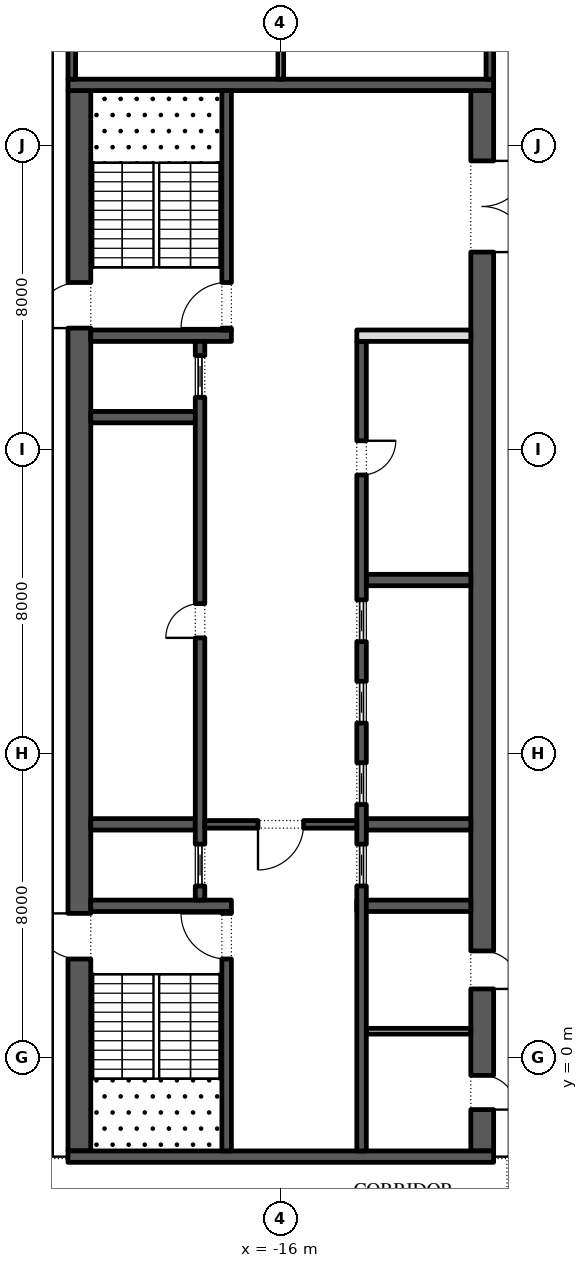
"""IFC4 building model, lengths in metres.
Left out: names, types, materials, properties, quantities, classifications, styles, units other than length and angle.
Written with IfcOpenShell. Run it as: python <this file> out.ifc"""

import sys

from ifc_helpers import new_model, si_unit, direction, frame, frame_2d, origin, place, context, subcontext, project, spatial, rectangle, extrude, element, fill, save


model = new_model("IFC4")
c1 = context("Model", 3, precision=1e-05, world=origin(), true_north=direction((0.0, 1.0)))
c2 = subcontext(c1, "Body", "Model", "MODEL_VIEW")
j1 = project(units=[si_unit("LENGTHUNIT", "METRE"), si_unit("PLANEANGLEUNIT", "RADIAN")], contexts=[c1])
p1 = place(None, origin())
s1 = spatial("IfcSite", under=j1, at=p1, CompositionType="ELEMENT")
p2 = place(p1, origin())
s2 = spatial("IfcBuilding", under=s1, at=p2, CompositionType="ELEMENT")
p3 = place(p2, frame((0.0, 0.0, 280.8)))
s3 = spatial("IfcBuildingStorey", under=s2, at=p3, CompositionType="ELEMENT", Elevation=280.8)
p4 = place(p3, frame((-21.359, 48.678, 0.0), z_axis=(0.0, 0.0, 1.0), x_axis=(-0.224949198343, -0.974370493275, 0.0)))
e1 = element("IfcWall", 1, at=p4, inside=s3, PredefinedType="STANDARD", context=c2, shape_type="SweptSolid", body=[
    extrude(rectangle(XDim=49.5, YDim=0.3, at=frame_2d((24.75, 0.0))), origin(), (0.0, 0.0, 1.0), 4.0),
])
p5 = place(p4, frame((1.157, 0.0, 0.45)))
e2 = element("IfcOpeningElement", 2, at=p5, cuts=e1, PredefinedType="OPENING", context=c2, shape_type="SweptSolid", body=[
    extrude(rectangle(XDim=4.5, YDim=3.05, at=frame_2d((2.25, 1.525))), frame((0.0, 0.16, 0.0), z_axis=(0.0, -1.0, 0.0), x_axis=(1.0, 0.0, 0.0)), (0.0, 0.0, 1.0), 0.32),
])
p6 = place(p4, frame((9.171, 0.0, 0.0)))
e3 = element("IfcOpeningElement", 3, at=p6, cuts=e1, PredefinedType="OPENING", context=c2, shape_type="SweptSolid", body=[
    extrude(rectangle(XDim=2.4, YDim=3.5, at=frame_2d((1.2, 1.75))), frame((0.0, 0.16, 0.0), z_axis=(0.0, -1.0, 0.0), x_axis=(1.0, 0.0, 0.0)), (0.0, 0.0, 1.0), 0.32),
])
p7 = place(p4, frame((15.236, 0.0, 0.45)))
e4 = element("IfcOpeningElement", 4, at=p7, cuts=e1, PredefinedType="OPENING", context=c2, shape_type="SweptSolid", body=[
    extrude(rectangle(XDim=4.5, YDim=3.05, at=frame_2d((2.25, 1.525))), frame((0.0, 0.16, 0.0), z_axis=(0.0, -1.0, 0.0), x_axis=(1.0, 0.0, 0.0)), (0.0, 0.0, 1.0), 0.32),
])
p8 = place(p4, frame((22.35, 0.0, 0.45)))
e5 = element("IfcOpeningElement", 5, at=p8, cuts=e1, PredefinedType="OPENING", context=c2, shape_type="SweptSolid", body=[
    extrude(rectangle(XDim=4.5, YDim=3.05, at=frame_2d((2.25, 1.525))), frame((0.0, 0.16, 0.0), z_axis=(0.0, -1.0, 0.0), x_axis=(1.0, 0.0, 0.0)), (0.0, 0.0, 1.0), 0.32),
])
p9 = place(p4, frame((29.464, 0.0, 0.45)))
e6 = element("IfcOpeningElement", 6, at=p9, cuts=e1, PredefinedType="OPENING", context=c2, shape_type="SweptSolid", body=[
    extrude(rectangle(XDim=4.5, YDim=3.05, at=frame_2d((2.25, 1.525))), frame((0.0, 0.16, 0.0), z_axis=(0.0, -1.0, 0.0), x_axis=(1.0, 0.0, 0.0)), (0.0, 0.0, 1.0), 0.32),
])
p10 = place(p4, frame((37.628, 0.0, 0.0)))
e7 = element("IfcOpeningElement", 7, at=p10, cuts=e1, PredefinedType="OPENING", context=c2, shape_type="SweptSolid", body=[
    extrude(rectangle(XDim=2.4, YDim=3.325, at=frame_2d((1.2, 1.663))), frame((0.0, 0.16, 0.0), z_axis=(0.0, -1.0, 0.0), x_axis=(1.0, 0.0, 0.0)), (0.0, 0.0, 1.0), 0.32),
])
p11 = place(p4, frame((43.693, 0.0, 0.45)))
e8 = element("IfcOpeningElement", 8, at=p11, cuts=e1, PredefinedType="OPENING", context=c2, shape_type="SweptSolid", body=[
    extrude(rectangle(XDim=4.5, YDim=2.825, at=frame_2d((2.25, 1.413))), frame((0.0, 0.16, 0.0), z_axis=(0.0, -1.0, 0.0), x_axis=(1.0, 0.0, 0.0)), (0.0, 0.0, 1.0), 0.32),
])
p12 = place(p3, frame((-21.3, -2.45, 0.0), z_axis=(0.0, 0.0, 1.0), x_axis=(0.0, 1.0, 0.0)))
e9 = element("IfcWall", 9, at=p12, inside=s3, PredefinedType="SHEAR", context=c2, shape_type="SweptSolid", body=[
    extrude(rectangle(XDim=27.9, YDim=0.6, at=frame_2d((13.95, 0.0))), origin(), (0.0, 0.0, 1.0), 4.0),
])
p13 = place(p12, frame((5.05, 0.0, 0.0)))
e10 = element("IfcOpeningElement", 10, at=p13, cuts=e9, PredefinedType="OPENING", context=c2, shape_type="SweptSolid", body=[
    extrude(rectangle(XDim=1.2, YDim=2.1, at=frame_2d((0.6, 1.05))), frame((0.0, 0.31, 0.0), z_axis=(0.0, -1.0, 0.0), x_axis=(1.0, 0.0, 0.0)), (0.0, 0.0, 1.0), 0.62),
])
p14 = place(p12, frame((21.65, 0.0, 0.0)))
e11 = element("IfcOpeningElement", 11, at=p14, cuts=e9, PredefinedType="OPENING", context=c2, shape_type="SweptSolid", body=[
    extrude(rectangle(XDim=1.2, YDim=2.1, at=frame_2d((0.6, 1.05))), frame((0.0, 0.31, 0.0), z_axis=(0.0, -1.0, 0.0), x_axis=(1.0, 0.0, 0.0)), (0.0, 0.0, 1.0), 0.62),
])
p15 = place(p3, frame((-10.7, -2.45, 0.0), z_axis=(0.0, 0.0, 1.0), x_axis=(0.0, 1.0, 0.0)))
e12 = element("IfcWall", 12, at=p15, inside=s3, PredefinedType="SHEAR", context=c2, shape_type="SweptSolid", body=[
    extrude(rectangle(XDim=27.9, YDim=0.6, at=frame_2d((13.95, 0.0))), origin(), (0.0, 0.0, 1.0), 4.0),
])
p16 = place(p15, frame((23.65, 0.0, 0.0)))
e13 = element("IfcOpeningElement", 13, at=p16, cuts=e12, PredefinedType="OPENING", context=c2, shape_type="SweptSolid", body=[
    extrude(rectangle(XDim=2.4, YDim=2.1, at=frame_2d((1.2, 1.05))), frame((0.0, 0.31, 0.0), z_axis=(0.0, -1.0, 0.0), x_axis=(1.0, 0.0, 0.0)), (0.0, 0.0, 1.0), 0.62),
])
p17 = place(p15, frame((1.087, 0.0, 0.0)))
e14 = element("IfcOpeningElement", 14, at=p17, cuts=e12, PredefinedType="OPENING", context=c2, shape_type="SweptSolid", body=[
    extrude(rectangle(XDim=0.9, YDim=2.1, at=frame_2d((0.45, 1.05))), frame((0.0, 0.31, 0.0), z_axis=(0.0, -1.0, 0.0), x_axis=(1.0, 0.0, 0.0)), (0.0, 0.0, 1.0), 0.62),
])
p18 = place(p15, frame((4.262, 0.0, 0.0)))
e15 = element("IfcOpeningElement", 15, at=p18, cuts=e12, PredefinedType="OPENING", context=c2, shape_type="SweptSolid", body=[
    extrude(rectangle(XDim=1.0, YDim=2.1, at=frame_2d((0.5, 1.05))), frame((0.0, 0.31, 0.0), z_axis=(0.0, -1.0, 0.0), x_axis=(1.0, 0.0, 0.0)), (0.0, 0.0, 1.0), 0.62),
])
for number, where, z_axis, x_axis in (
    (16, (-21.6, -2.6, 0.0), (0.0, 0.0, 1.0), (1.0, 0.0, 0.0)),
    (17, (-21.6, 25.6, 0.0), (0.0, 0.0, 1.0), (1.0, 0.0, 0.0)),
):
    element("IfcWall", number, at=place(p3, frame(where, z_axis=z_axis, x_axis=x_axis)), inside=s3, PredefinedType="SHEAR", context=c2, shape_type="SweptSolid", body=[
        extrude(rectangle(XDim=11.2, YDim=0.3, at=frame_2d((5.6, 0.0))), origin(), (0.0, 0.0, 1.0), 4.0),
    ])
p19 = place(p3, frame((-21.0, 4.0, 0.0), z_axis=(0.0, 0.0, 1.0), x_axis=(1.0, 0.0, 0.0)))
e18 = element("IfcWall", 18, at=p19, inside=s3, PredefinedType="SHEAR", context=c2, shape_type="SweptSolid", body=[
    extrude(rectangle(XDim=3.7, YDim=0.3, at=frame_2d((1.85, 0.0))), origin(), (0.0, 0.0, 1.0), 4.0),
])
p20 = place(p3, frame((-17.425, -2.45, 0.0), z_axis=(0.0, 0.0, 1.0), x_axis=(0.0, 1.0, 0.0)))
e19 = element("IfcWall", 19, at=p20, inside=s3, PredefinedType="SHEAR", context=c2, shape_type="SweptSolid", body=[
    extrude(rectangle(XDim=6.3, YDim=0.25, at=frame_2d((3.15, 0.0))), origin(), (0.0, 0.0, 1.0), 4.0),
])
p21 = place(p20, frame((5.05, 0.0, 0.0)))
e20 = element("IfcOpeningElement", 20, at=p21, cuts=e19, PredefinedType="OPENING", context=c2, shape_type="SweptSolid", body=[
    extrude(rectangle(XDim=1.2, YDim=2.1, at=frame_2d((0.6, 1.05))), frame((0.0, 0.135, 0.0), z_axis=(0.0, -1.0, 0.0), x_axis=(1.0, 0.0, 0.0)), (0.0, 0.0, 1.0), 0.27),
])
p22 = place(p3, frame((-21.0, 19.0, 0.0), z_axis=(0.0, 0.0, 1.0), x_axis=(1.0, 0.0, 0.0)))
e21 = element("IfcWall", 21, at=p22, inside=s3, PredefinedType="SHEAR", context=c2, shape_type="SweptSolid", body=[
    extrude(rectangle(XDim=3.7, YDim=0.3, at=frame_2d((1.85, 0.0))), origin(), (0.0, 0.0, 1.0), 4.0),
])
p23 = place(p3, frame((-17.425, 19.15, 0.0), z_axis=(0.0, 0.0, 1.0), x_axis=(0.0, 1.0, 0.0)))
e22 = element("IfcWall", 22, at=p23, inside=s3, PredefinedType="SHEAR", context=c2, shape_type="SweptSolid", body=[
    extrude(rectangle(XDim=6.3, YDim=0.25, at=frame_2d((3.15, 0.0))), origin(), (0.0, 0.0, 1.0), 4.0),
])
p24 = place(p23, frame((0.05, 0.0, 0.0)))
e23 = element("IfcOpeningElement", 23, at=p24, cuts=e22, PredefinedType="OPENING", context=c2, shape_type="SweptSolid", body=[
    extrude(rectangle(XDim=1.2, YDim=2.1, at=frame_2d((0.6, 1.05))), frame((0.0, 0.135, 0.0), z_axis=(0.0, -1.0, 0.0), x_axis=(1.0, 0.0, 0.0)), (0.0, 0.0, 1.0), 0.27),
])
for number, where, z_axis, x_axis in (
    (24, (-21.0, 6.143, 0.0), (0.0, 0.0, 1.0), (1.0, 0.0, 0.0)),
    (25, (-21.0, 16.857, 0.0), (0.0, 0.0, 1.0), (1.0, 0.0, 0.0)),
):
    element("IfcWall", number, at=place(p3, frame(where, z_axis=z_axis, x_axis=x_axis)), inside=s3, PredefinedType="SHEAR", context=c2, shape_type="SweptSolid", body=[
        extrude(rectangle(XDim=2.75, YDim=0.3, at=frame_2d((1.375, 0.0))), origin(), (0.0, 0.0, 1.0), 4.0),
    ])
p25 = place(p3, frame((-18.125, 4.15, 0.0), z_axis=(0.0, 0.0, 1.0), x_axis=(0.0, 1.0, 0.0)))
e26 = element("IfcWall", 26, at=p25, inside=s3, PredefinedType="SHEAR", context=c2, shape_type="SweptSolid", body=[
    extrude(rectangle(XDim=14.7, YDim=0.25, at=frame_2d((7.35, 0.0))), origin(), (0.0, 0.0, 1.0), 4.0),
])
p26 = place(p25, frame((6.9, 0.0, 0.0)))
e27 = element("IfcOpeningElement", 27, at=p26, cuts=e26, PredefinedType="OPENING", context=c2, shape_type="SweptSolid", body=[
    extrude(rectangle(XDim=0.9, YDim=2.1, at=frame_2d((0.45, 1.05))), frame((0.0, 0.135, 0.0), z_axis=(0.0, -1.0, 0.0), x_axis=(1.0, 0.0, 0.0)), (0.0, 0.0, 1.0), 0.27),
])
p27 = place(p25, frame((0.371, 0.0, 0.0)))
e28 = element("IfcOpeningElement", 28, at=p27, cuts=e26, PredefinedType="OPENING", context=c2, shape_type="SweptSolid", body=[
    extrude(rectangle(XDim=1.1, YDim=2.1, at=frame_2d((0.55, 1.05))), frame((0.0, 0.135, 0.0), z_axis=(0.0, -1.0, 0.0), x_axis=(1.0, 0.0, 0.0)), (0.0, 0.0, 1.0), 0.27),
])
p28 = place(p25, frame((13.229, 0.0, 0.0)))
e29 = element("IfcOpeningElement", 29, at=p28, cuts=e26, PredefinedType="OPENING", context=c2, shape_type="SweptSolid", body=[
    extrude(rectangle(XDim=1.1, YDim=2.1, at=frame_2d((0.55, 1.05))), frame((0.0, 0.135, 0.0), z_axis=(0.0, -1.0, 0.0), x_axis=(1.0, 0.0, 0.0)), (0.0, 0.0, 1.0), 0.27),
])
p29 = place(p3, frame((-14.0, 4.0, 0.0), z_axis=(0.0, 0.0, 1.0), x_axis=(1.0, 0.0, 0.0)))
e30 = element("IfcWall", 30, at=p29, inside=s3, PredefinedType="SHEAR", context=c2, shape_type="SweptSolid", body=[
    extrude(rectangle(XDim=3.0, YDim=0.3, at=frame_2d((1.5, 0.0))), origin(), (0.0, 0.0, 1.0), 4.0),
])
for number, where, z_axis, x_axis in (
    (31, (-13.75, 6.143, 0.0), (0.0, 0.0, 1.0), (1.0, 0.0, 0.0)),
    (32, (-13.75, 12.571, 0.0), (0.0, 0.0, 1.0), (1.0, 0.0, 0.0)),
):
    element("IfcWall", number, at=place(p3, frame(where, z_axis=z_axis, x_axis=x_axis)), inside=s3, PredefinedType="SHEAR", context=c2, shape_type="SweptSolid", body=[
        extrude(rectangle(XDim=2.75, YDim=0.3, at=frame_2d((1.375, 0.0))), origin(), (0.0, 0.0, 1.0), 4.0),
    ])
p30 = place(p3, frame((-13.875, -2.45, 0.0), z_axis=(0.0, 0.0, 1.0), x_axis=(0.0, 1.0, 0.0)))
e33 = element("IfcWall", 33, at=p30, inside=s3, PredefinedType="SHEAR", context=c2, shape_type="SweptSolid", body=[
    extrude(rectangle(XDim=21.3, YDim=0.25, at=frame_2d((10.65, 0.0))), origin(), (0.0, 0.0, 1.0), 4.0),
])
p31 = place(p30, frame((17.786, 0.0, 0.0)))
e34 = element("IfcOpeningElement", 34, at=p31, cuts=e33, PredefinedType="OPENING", context=c2, shape_type="SweptSolid", body=[
    extrude(rectangle(XDim=0.9, YDim=2.1, at=frame_2d((0.45, 1.05))), frame((0.0, 0.135, 0.0), z_axis=(0.0, -1.0, 0.0), x_axis=(1.0, 0.0, 0.0)), (0.0, 0.0, 1.0), 0.27),
])
p32 = place(p30, frame((6.971, 0.0, 0.0)))
e35 = element("IfcOpeningElement", 35, at=p32, cuts=e33, PredefinedType="OPENING", context=c2, shape_type="SweptSolid", body=[
    extrude(rectangle(XDim=1.1, YDim=2.1, at=frame_2d((0.55, 1.05))), frame((0.0, 0.135, 0.0), z_axis=(0.0, -1.0, 0.0), x_axis=(1.0, 0.0, 0.0)), (0.0, 0.0, 1.0), 0.27),
])
p33 = place(p30, frame((9.114, 0.0, 0.0)))
e36 = element("IfcOpeningElement", 36, at=p33, cuts=e33, PredefinedType="OPENING", context=c2, shape_type="SweptSolid", body=[
    extrude(rectangle(XDim=1.1, YDim=2.1, at=frame_2d((0.55, 1.05))), frame((0.0, 0.135, 0.0), z_axis=(0.0, -1.0, 0.0), x_axis=(1.0, 0.0, 0.0)), (0.0, 0.0, 1.0), 0.27),
])
p34 = place(p30, frame((11.257, 0.0, 0.0)))
e37 = element("IfcOpeningElement", 37, at=p34, cuts=e33, PredefinedType="OPENING", context=c2, shape_type="SweptSolid", body=[
    extrude(rectangle(XDim=1.1, YDim=2.1, at=frame_2d((0.55, 1.05))), frame((0.0, 0.135, 0.0), z_axis=(0.0, -1.0, 0.0), x_axis=(1.0, 0.0, 0.0)), (0.0, 0.0, 1.0), 0.27),
])
p35 = place(p30, frame((13.4, 0.0, 0.0)))
e38 = element("IfcOpeningElement", 38, at=p35, cuts=e33, PredefinedType="OPENING", context=c2, shape_type="SweptSolid", body=[
    extrude(rectangle(XDim=1.1, YDim=2.1, at=frame_2d((0.55, 1.05))), frame((0.0, 0.135, 0.0), z_axis=(0.0, -1.0, 0.0), x_axis=(1.0, 0.0, 0.0)), (0.0, 0.0, 1.0), 0.27),
])
p36 = place(p3, frame((-14.0, 19.0, 0.0), z_axis=(0.0, 0.0, 1.0), x_axis=(1.0, 0.0, 0.0)))
e39 = element("IfcWall", 39, at=p36, inside=s3, PredefinedType="PARTITIONING", context=c2, shape_type="SweptSolid", body=[
    extrude(rectangle(XDim=3.0, YDim=0.3, at=frame_2d((1.5, 0.0))), origin(), (0.0, 0.0, 1.0), 4.0),
])
p37 = place(p3, frame((-18.0, 6.143, 0.0), z_axis=(0.0, 0.0, 1.0), x_axis=(1.0, 0.0, 0.0)))
e40 = element("IfcWall", 40, at=p37, inside=s3, PredefinedType="SHEAR", context=c2, shape_type="SweptSolid", body=[
    extrude(rectangle(XDim=4.0, YDim=0.2, at=frame_2d((2.0, 0.0))), origin(), (0.0, 0.0, 1.0), 4.0),
])
p38 = place(p37, frame((1.4, 0.0, 0.0)))
e41 = element("IfcOpeningElement", 41, at=p38, cuts=e40, PredefinedType="OPENING", context=c2, shape_type="SweptSolid", body=[
    extrude(rectangle(XDim=1.2, YDim=2.1, at=frame_2d((0.6, 1.05))), frame((0.0, 0.11, 0.0), z_axis=(0.0, -1.0, 0.0), x_axis=(1.0, 0.0, 0.0)), (0.0, 0.0, 1.0), 0.22),
])
p39 = place(p3, frame((-13.75, 0.7, 0.0), z_axis=(0.0, 0.0, 1.0), x_axis=(1.0, 0.0, 0.0)))
e42 = element("IfcWall", 42, at=p39, inside=s3, PredefinedType="PARTITIONING", context=c2, shape_type="SweptSolid", body=[
    extrude(rectangle(XDim=2.75, YDim=0.15, at=frame_2d((1.375, 0.0))), origin(), (0.0, 0.0, 1.0), 4.0),
])
p40 = place(p3, frame((-21.5, 25.75, 0.0), z_axis=(0.0, 0.0, 1.0), x_axis=(0.0, 1.0, 0.0)))
e43 = element("IfcWall", 43, at=p40, inside=s3, PredefinedType="SHEAR", context=c2, shape_type="SweptSolid", body=[
    extrude(rectangle(XDim=4.75, YDim=0.2, at=frame_2d((2.375, 0.0))), origin(), (0.0, 0.0, 1.0), 4.0),
])
p41 = place(p40, frame((1.925, 0.0, 0.0)))
e44 = element("IfcOpeningElement", 44, at=p41, cuts=e43, PredefinedType="OPENING", context=c2, shape_type="SweptSolid", body=[
    extrude(rectangle(XDim=0.9, YDim=2.1, at=frame_2d((0.45, 1.05))), frame((0.0, 0.11, 0.0), z_axis=(0.0, -1.0, 0.0), x_axis=(1.0, 0.0, 0.0)), (0.0, 0.0, 1.0), 0.22),
])
p42 = place(p3, frame((-10.5, 25.75, 0.0), z_axis=(0.0, 0.0, 1.0), x_axis=(0.0, 1.0, 0.0)))
e45 = element("IfcWall", 45, at=p42, inside=s3, PredefinedType="SHEAR", context=c2, shape_type="SweptSolid", body=[
    extrude(rectangle(XDim=4.75, YDim=0.2, at=frame_2d((2.375, 0.0))), origin(), (0.0, 0.0, 1.0), 4.0),
])
p43 = place(p42, frame((1.925, 0.0, 0.0)))
e46 = element("IfcOpeningElement", 46, at=p43, cuts=e45, PredefinedType="OPENING", context=c2, shape_type="SweptSolid", body=[
    extrude(rectangle(XDim=0.9, YDim=2.1, at=frame_2d((0.45, 1.05))), frame((0.0, 0.11, 0.0), z_axis=(0.0, -1.0, 0.0), x_axis=(1.0, 0.0, 0.0)), (0.0, 0.0, 1.0), 0.22),
])
p44 = place(p3, frame((-16.0, 25.75, 0.0), z_axis=(0.0, 0.0, 1.0), x_axis=(0.0, 1.0, 0.0)))
e47 = element("IfcWall", 47, at=p44, inside=s3, PredefinedType="PARTITIONING", context=c2, shape_type="SweptSolid", body=[
    extrude(rectangle(XDim=4.75, YDim=0.15, at=frame_2d((2.375, 0.0))), origin(), (0.0, 0.0, 1.0), 4.0),
])
p45 = place(p26, origin())
e48 = element("IfcDoor", 48, at=p45, inside=s3, OperationType="SINGLE_SWING_RIGHT", PredefinedType="DOOR", context=c2, shape_type="SweptSolid", body=[
    extrude(rectangle(XDim=0.9, YDim=2.1, at=frame_2d((0.45, 1.05))), frame((0.0, 0.125, 0.0), z_axis=(0.0, -1.0, 0.0), x_axis=(1.0, 0.0, 0.0)), (0.0, 0.0, 1.0), 0.05),
])
fill(e27, e48)
p46 = place(p27, origin())
e49 = element("IfcDoor", 49, at=p46, inside=s3, OperationType="SLIDING_TO_LEFT", PredefinedType="DOOR", context=c2, shape_type="SweptSolid", body=[
    extrude(rectangle(XDim=1.1, YDim=2.1, at=frame_2d((0.55, 1.05))), frame((0.0, 0.025, 0.0), z_axis=(0.0, -1.0, 0.0), x_axis=(1.0, 0.0, 0.0)), (0.0, 0.0, 1.0), 0.05),
])
fill(e28, e49)
p47 = place(p28, origin())
e50 = element("IfcDoor", 50, at=p47, inside=s3, OperationType="SLIDING_TO_LEFT", PredefinedType="DOOR", context=c2, shape_type="SweptSolid", body=[
    extrude(rectangle(XDim=1.1, YDim=2.1, at=frame_2d((0.55, 1.05))), frame((0.0, 0.025, 0.0), z_axis=(0.0, -1.0, 0.0), x_axis=(1.0, 0.0, 0.0)), (0.0, 0.0, 1.0), 0.05),
])
fill(e29, e50)
p48 = place(p31, frame((0.9, -0.2, 0.0), z_axis=(0.0, 0.0, 1.0), x_axis=(-1.0, 0.0, 0.0)))
e51 = element("IfcDoor", 51, at=p48, inside=s3, OperationType="SINGLE_SWING_RIGHT", PredefinedType="DOOR", context=c2, shape_type="SweptSolid", body=[
    extrude(rectangle(XDim=0.9, YDim=2.1, at=frame_2d((0.45, 1.05))), frame((0.0, -0.075, 0.0), z_axis=(0.0, -1.0, 0.0), x_axis=(1.0, 0.0, 0.0)), (0.0, 0.0, 1.0), 0.05),
])
fill(e34, e51)
p49 = place(p32, origin())
e52 = element("IfcDoor", 52, at=p49, inside=s3, OperationType="SLIDING_TO_LEFT", PredefinedType="DOOR", context=c2, shape_type="SweptSolid", body=[
    extrude(rectangle(XDim=1.1, YDim=2.1, at=frame_2d((0.55, 1.05))), frame((0.0, 0.025, 0.0), z_axis=(0.0, -1.0, 0.0), x_axis=(1.0, 0.0, 0.0)), (0.0, 0.0, 1.0), 0.05),
])
fill(e35, e52)
p50 = place(p33, origin())
e53 = element("IfcDoor", 53, at=p50, inside=s3, OperationType="SLIDING_TO_LEFT", PredefinedType="DOOR", context=c2, shape_type="SweptSolid", body=[
    extrude(rectangle(XDim=1.1, YDim=2.1, at=frame_2d((0.55, 1.05))), frame((0.0, 0.025, 0.0), z_axis=(0.0, -1.0, 0.0), x_axis=(1.0, 0.0, 0.0)), (0.0, 0.0, 1.0), 0.05),
])
fill(e36, e53)
p51 = place(p34, origin())
e54 = element("IfcDoor", 54, at=p51, inside=s3, OperationType="SLIDING_TO_LEFT", PredefinedType="DOOR", context=c2, shape_type="SweptSolid", body=[
    extrude(rectangle(XDim=1.1, YDim=2.1, at=frame_2d((0.55, 1.05))), frame((0.0, 0.025, 0.0), z_axis=(0.0, -1.0, 0.0), x_axis=(1.0, 0.0, 0.0)), (0.0, 0.0, 1.0), 0.05),
])
fill(e37, e54)
p52 = place(p35, origin())
e55 = element("IfcDoor", 55, at=p52, inside=s3, OperationType="SLIDING_TO_LEFT", PredefinedType="DOOR", context=c2, shape_type="SweptSolid", body=[
    extrude(rectangle(XDim=1.1, YDim=2.1, at=frame_2d((0.55, 1.05))), frame((0.0, 0.025, 0.0), z_axis=(0.0, -1.0, 0.0), x_axis=(1.0, 0.0, 0.0)), (0.0, 0.0, 1.0), 0.05),
])
fill(e38, e55)
p53 = place(p38, frame((1.2, 0.0, 0.0), z_axis=(0.0, 0.0, 1.0), x_axis=(-1.0, 0.0, 0.0)))
e56 = element("IfcDoor", 56, at=p53, inside=s3, OperationType="SINGLE_SWING_LEFT", PredefinedType="DOOR", context=c2, shape_type="SweptSolid", body=[
    extrude(rectangle(XDim=1.2, YDim=2.1, at=frame_2d((0.6, 1.05))), frame((0.0, 0.025, 0.0), z_axis=(0.0, -1.0, 0.0), x_axis=(1.0, 0.0, 0.0)), (0.0, 0.0, 1.0), 0.05),
])
fill(e41, e56)
p54 = place(p16, frame((2.4, 0.0, 0.0), z_axis=(0.0, 0.0, 1.0), x_axis=(-1.0, 0.0, 0.0)))
e57 = element("IfcDoor", 57, at=p54, inside=s3, OperationType="DOUBLE_DOOR_SINGLE_SWING", PredefinedType="DOOR", context=c2, shape_type="SweptSolid", body=[
    extrude(rectangle(XDim=2.4, YDim=2.1, at=frame_2d((1.2, 1.05))), frame((0.0, 0.025, 0.0), z_axis=(0.0, -1.0, 0.0), x_axis=(1.0, 0.0, 0.0)), (0.0, 0.0, 1.0), 0.05),
])
fill(e13, e57)
p55 = place(p21, origin())
e58 = element("IfcDoor", 58, at=p55, inside=s3, OperationType="SINGLE_SWING_LEFT", PredefinedType="DOOR", context=c2, shape_type="SweptSolid", body=[
    extrude(rectangle(XDim=1.2, YDim=2.1, at=frame_2d((0.6, 1.05))), frame((0.0, 0.025, 0.0), z_axis=(0.0, -1.0, 0.0), x_axis=(1.0, 0.0, 0.0)), (0.0, 0.0, 1.0), 0.05),
])
fill(e20, e58)
p56 = place(p13, origin())
e59 = element("IfcDoor", 59, at=p56, inside=s3, OperationType="SINGLE_SWING_LEFT", PredefinedType="DOOR", context=c2, shape_type="SweptSolid", body=[
    extrude(rectangle(XDim=1.2, YDim=2.1, at=frame_2d((0.6, 1.05))), frame((0.0, 0.025, 0.0), z_axis=(0.0, -1.0, 0.0), x_axis=(1.0, 0.0, 0.0)), (0.0, 0.0, 1.0), 0.05),
])
fill(e10, e59)
p57 = place(p24, origin())
e60 = element("IfcDoor", 60, at=p57, inside=s3, OperationType="SINGLE_SWING_RIGHT", PredefinedType="DOOR", context=c2, shape_type="SweptSolid", body=[
    extrude(rectangle(XDim=1.2, YDim=2.1, at=frame_2d((0.6, 1.05))), frame((0.0, 0.025, 0.0), z_axis=(0.0, -1.0, 0.0), x_axis=(1.0, 0.0, 0.0)), (0.0, 0.0, 1.0), 0.05),
])
fill(e23, e60)
p58 = place(p14, origin())
e61 = element("IfcDoor", 61, at=p58, inside=s3, OperationType="SINGLE_SWING_RIGHT", PredefinedType="DOOR", context=c2, shape_type="SweptSolid", body=[
    extrude(rectangle(XDim=1.2, YDim=2.1, at=frame_2d((0.6, 1.05))), frame((0.0, 0.025, 0.0), z_axis=(0.0, -1.0, 0.0), x_axis=(1.0, 0.0, 0.0)), (0.0, 0.0, 1.0), 0.05),
])
fill(e11, e61)
p59 = place(p17, frame((0.9, 0.55, 0.0), z_axis=(0.0, 0.0, 1.0), x_axis=(-1.0, 0.0, 0.0)))
e62 = element("IfcDoor", 62, at=p59, inside=s3, OperationType="SINGLE_SWING_LEFT", PredefinedType="DOOR", context=c2, shape_type="SweptSolid", body=[
    extrude(rectangle(XDim=0.9, YDim=2.1, at=frame_2d((0.45, 1.05))), frame((0.0, 0.3, 0.0), z_axis=(0.0, -1.0, 0.0), x_axis=(1.0, 0.0, 0.0)), (0.0, 0.0, 1.0), 0.05),
])
fill(e14, e62)
p60 = place(p18, frame((1.0, 0.55, 0.0), z_axis=(0.0, 0.0, 1.0), x_axis=(-1.0, 0.0, 0.0)))
e63 = element("IfcDoor", 63, at=p60, inside=s3, OperationType="SINGLE_SWING_LEFT", PredefinedType="DOOR", context=c2, shape_type="SweptSolid", body=[
    extrude(rectangle(XDim=1.0, YDim=2.1, at=frame_2d((0.5, 1.05))), frame((0.0, 0.3, 0.0), z_axis=(0.0, -1.0, 0.0), x_axis=(1.0, 0.0, 0.0)), (0.0, 0.0, 1.0), 0.05),
])
fill(e15, e63)
save(model, sys.argv[1])
